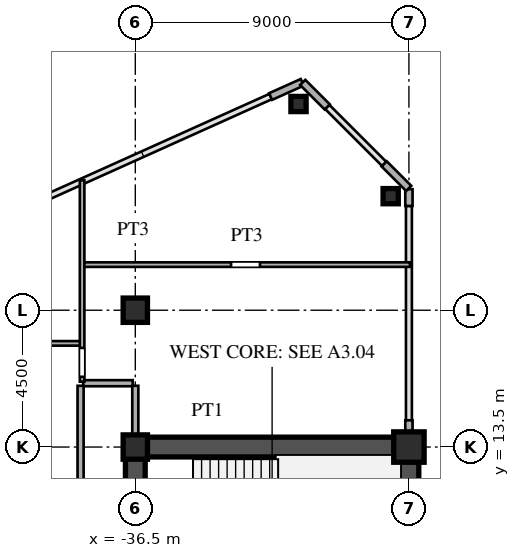
"""IFC4 building model, lengths in metres.
Left out: names, types, materials, properties, quantities, classifications, styles, units other than length and angle.
Written with IfcOpenShell. Run it as: python <this file> out.ifc"""

import sys

from ifc_helpers import new_model, si_unit, direction, frame, frame_2d, origin, origin_2d, place, context, subcontext, project, spatial, rectangle, hollow_rectangle, i_section, extrude, source, transform, mapped, element, save


model = new_model("IFC4")
c1 = context("Model", 3, precision=1e-05, world=origin(), true_north=direction((0.0, 1.0)))
c2 = subcontext(c1, "Body", "Model", "MODEL_VIEW")
j1 = project(units=[si_unit("LENGTHUNIT", "METRE"), si_unit("PLANEANGLEUNIT", "RADIAN")], contexts=[c1])
p1 = place(None, origin())
s1 = spatial("IfcSite", under=j1, at=p1, CompositionType="ELEMENT")
p2 = place(p1, origin())
s2 = spatial("IfcBuilding", under=s1, at=p2, CompositionType="ELEMENT")
p3 = place(p2, frame((0.0, 0.0, 72.9)))
s3 = spatial("IfcBuildingStorey", under=s2, at=p3, CompositionType="ELEMENT", Elevation=72.9)
m1 = source(origin(), c2, "Body", "SweptSolid", [
    extrude(hollow_rectangle(XDim=1.0, YDim=1.0, WallThickness=0.042, at=origin_2d()), origin(), (0.0, 0.0, 1.0), 3.6),
])
p4 = place(p3, frame((-27.5, 13.5, 0.0), z_axis=(0.0, 0.0, 1.0), x_axis=(1.0, 0.0, 0.0)))
e1 = element("IfcColumn", 1, at=p4, inside=s3, PredefinedType="COLUMN", context=c2, shape_type="MappedRepresentation", body=[
    mapped(m1, transform((0.0, 0.0, 0.0), scale=1.0)),
])
m2 = source(origin(), c2, "Body", "SweptSolid", [
    extrude(i_section(OverallWidth=0.8, OverallDepth=0.8, WebThickness=0.032, FlangeThickness=0.05, at=origin_2d()), origin(), (0.0, 0.0, 1.0), 3.6),
])
for number, where, z_axis, x_axis in (
    (2, (-36.5, 13.5, 0.0), (0.0, 0.0, 1.0), (1.0, 0.0, 0.0)),
    (3, (-36.5, 18.0, 0.0), (0.0, 0.0, 1.0), (1.0, 0.0, 0.0)),
):
    element("IfcColumn", number, at=place(p3, frame(where, z_axis=z_axis, x_axis=x_axis)), inside=s3, PredefinedType="COLUMN", context=c2, shape_type="MappedRepresentation", body=[
        mapped(m2, transform((0.0, 0.0, 0.0), scale=1.0)),
    ])
m3 = source(origin(), c2, "Body", "SweptSolid", [
    extrude(hollow_rectangle(XDim=0.5, YDim=0.5, WallThickness=0.02, at=origin_2d()), origin(), (0.0, 0.0, 1.0), 3.6),
])
for number, where, z_axis, x_axis in (
    (4, (-28.1, 21.751, 0.0), (0.0, 0.0, 1.0), (1.0, 0.0, 0.0)),
    (5, (-31.131, 24.783, 0.0), (0.0, 0.0, 1.0), (1.0, 0.0, 0.0)),
):
    element("IfcColumn", number, at=place(p3, frame(where, z_axis=z_axis, x_axis=x_axis)), inside=s3, PredefinedType="COLUMN", context=c2, shape_type="MappedRepresentation", body=[
        mapped(m3, transform((0.0, 0.0, 0.0), scale=1.0)),
    ])
p5 = place(p3, frame((-27.5, 13.83, 0.0), z_axis=(0.0, 0.0, 1.0), x_axis=(0.0, 1.0, 0.0)))
e6 = element("IfcWall", 6, at=p5, inside=s3, PredefinedType="SOLIDWALL", context=c2, shape_type="SweptSolid", body=[
    extrude(rectangle(XDim=0.55, YDim=0.24, at=frame_2d((0.275, 0.0))), origin(), (0.0, 0.0, 1.0), 2.88),
])
p6 = place(p3, frame((-27.5, 21.43, 0.0), z_axis=(0.0, 0.0, 1.0), x_axis=(0.0, 1.0, 0.0)))
e7 = element("IfcWall", 7, at=p6, inside=s3, PredefinedType="SOLIDWALL", context=c2, shape_type="SweptSolid", body=[
    extrude(rectangle(XDim=0.55, YDim=0.24, at=frame_2d((0.275, 0.0))), origin(), (0.0, 0.0, 1.0), 3.38),
])
for number, where, z_axis, x_axis in (
    (8, (-27.507, 22.007, 0.0), (0.0, 0.0, 1.0), (-0.707, 0.707, 0.0)),
    (9, (-30.187, 24.687, 0.0), (0.0, 0.0, 1.0), (-0.707, 0.707, 0.0)),
):
    element("IfcWall", number, at=place(p3, frame(where, z_axis=z_axis, x_axis=x_axis)), inside=s3, PredefinedType="SOLIDWALL", context=c2, shape_type="SweptSolid", body=[
        extrude(rectangle(XDim=1.14, YDim=0.24, at=frame_2d((0.57, 0.0))), origin(), (0.0, 0.0, 1.0), 3.38),
    ])
p7 = place(p3, frame((-31.009, 25.496, 0.0), z_axis=(0.0, 0.0, 1.0), x_axis=(-0.911929519623, -0.410346866979, 0.0)))
e10 = element("IfcWall", 10, at=p7, inside=s3, PredefinedType="SOLIDWALL", context=c2, shape_type="SweptSolid", body=[
    extrude(rectangle(XDim=1.14, YDim=0.24, at=frame_2d((0.57, 0.0))), origin(), (0.0, 0.0, 1.0), 3.38),
])
p8 = place(p3, frame((-27.5, 1.3, 0.0), z_axis=(0.0, 0.0, 1.0), x_axis=(0.0, 1.0, 0.0)))
e11 = element("IfcWall", 11, at=p8, inside=s3, PredefinedType="SHEAR", context=c2, shape_type="SweptSolid", body=[
    extrude(rectangle(XDim=12.2, YDim=0.65, at=frame_2d((6.1, 0.0))), origin(), (0.0, 0.0, 1.0), 3.38),
])
p9 = place(p3, frame((-36.5, 13.5, 0.0), z_axis=(0.0, 0.0, 1.0), x_axis=(1.0, 0.0, 0.0)))
e12 = element("IfcWall", 12, at=p9, inside=s3, PredefinedType="SHEAR", context=c2, shape_type="SweptSolid", body=[
    extrude(rectangle(XDim=9.0, YDim=0.65, at=frame_2d((4.5, 0.0))), origin(), (0.0, 0.0, 1.0), 3.38),
])
p10 = place(p3, frame((-36.5, 8.2, 0.0), z_axis=(0.0, 0.0, 1.0), x_axis=(0.0, 1.0, 0.0)))
e13 = element("IfcWall", 13, at=p10, inside=s3, PredefinedType="SHEAR", context=c2, shape_type="SweptSolid", body=[
    extrude(rectangle(XDim=5.45, YDim=0.65, at=frame_2d((2.725, 0.0))), origin(), (0.0, 0.0, 1.0), 3.38),
])
p11 = place(p10, frame((0.245, 0.0, 0.0)))
e14 = element("IfcOpeningElement", 14, at=p11, cuts=e13, PredefinedType="OPENING", context=c2, shape_type="SweptSolid", body=[
    extrude(rectangle(XDim=0.95, YDim=2.15, at=frame_2d((0.475, 1.075))), frame((0.0, 0.335, 0.0), z_axis=(0.0, -1.0, 0.0), x_axis=(1.0, 0.0, 0.0)), (0.0, 0.0, 1.0), 0.67),
])
p12 = place(p3, frame((-38.215, 15.6, 0.0), z_axis=(0.0, 0.0, 1.0), x_axis=(1.0, 0.0, 0.0)))
e15 = element("IfcWall", 15, at=p12, inside=s3, PredefinedType="PARTITIONING", context=c2, shape_type="SweptSolid", body=[
    extrude(rectangle(XDim=1.63, YDim=0.2, at=frame_2d((0.815, 0.0))), origin(), (0.0, 0.0, 1.0), 3.38),
])
p13 = place(p3, frame((-44.4, 16.91, 0.0), z_axis=(0.0, 0.0, 1.0), x_axis=(1.0, 0.0, 0.0)))
e16 = element("IfcWall", 16, at=p13, inside=s3, PredefinedType="PARTITIONING", context=c2, shape_type="SweptSolid", body=[
    extrude(rectangle(XDim=6.1, YDim=0.15, at=frame_2d((3.05, 0.0))), origin(), (0.0, 0.0, 1.0), 3.38),
])
p14 = place(p3, frame((-38.2, 19.5, 0.0), z_axis=(0.0, 0.0, 1.0), x_axis=(1.0, 0.0, 0.0)))
e17 = element("IfcWall", 17, at=p14, inside=s3, PredefinedType="PARTITIONING", context=c2, shape_type="SweptSolid", body=[
    extrude(rectangle(XDim=10.735, YDim=0.15, at=frame_2d((5.367, 0.0))), origin(), (0.0, 0.0, 1.0), 3.38),
])
p15 = place(p14, frame((4.85, 0.0, 0.0)))
e18 = element("IfcOpeningElement", 18, at=p15, cuts=e17, PredefinedType="OPENING", context=c2, shape_type="SweptSolid", body=[
    extrude(rectangle(XDim=0.95, YDim=2.15, at=frame_2d((0.475, 1.075))), frame((0.0, 0.085, 0.0), z_axis=(0.0, -1.0, 0.0), x_axis=(1.0, 0.0, 0.0)), (0.0, 0.0, 1.0), 0.17),
])
p16 = place(p3, frame((-38.3, -15.515, 0.0), z_axis=(0.0, 0.0, 1.0), x_axis=(0.0, 1.0, 0.0)))
e19 = element("IfcWall", 19, at=p16, inside=s3, PredefinedType="PARTITIONING", context=c2, shape_type="SweptSolid", body=[
    extrude(rectangle(XDim=31.03, YDim=0.2, at=frame_2d((15.515, 0.0))), origin(), (0.0, 0.0, 1.0), 3.38),
])
p17 = place(p16, frame((1.345, 0.0, 0.0)))
e20 = element("IfcOpeningElement", 20, at=p17, cuts=e19, PredefinedType="OPENING", context=c2, shape_type="SweptSolid", body=[
    extrude(rectangle(XDim=1.05, YDim=2.25, at=frame_2d((0.525, 1.125))), frame((0.0, 0.11, 0.0), z_axis=(0.0, -1.0, 0.0), x_axis=(1.0, 0.0, 0.0)), (0.0, 0.0, 1.0), 0.22),
])
p18 = place(p16, frame((12.28, 0.0, 0.0)))
e21 = element("IfcOpeningElement", 21, at=p18, cuts=e19, PredefinedType="OPENING", context=c2, shape_type="SweptSolid", body=[
    extrude(rectangle(XDim=1.05, YDim=2.25, at=frame_2d((0.525, 1.125))), frame((0.0, 0.11, 0.0), z_axis=(0.0, -1.0, 0.0), x_axis=(1.0, 0.0, 0.0)), (0.0, 0.0, 1.0), 0.22),
])
p19 = place(p16, frame((25.067, 0.0, 0.0)))
e22 = element("IfcOpeningElement", 22, at=p19, cuts=e19, PredefinedType="OPENING", context=c2, shape_type="SweptSolid", body=[
    extrude(rectangle(XDim=1.05, YDim=2.25, at=frame_2d((0.525, 1.125))), frame((0.0, 0.11, 0.0), z_axis=(0.0, -1.0, 0.0), x_axis=(1.0, 0.0, 0.0)), (0.0, 0.0, 1.0), 0.22),
])
p20 = place(p3, frame((-38.25, 15.65, 0.0), z_axis=(0.0, 0.0, 1.0), x_axis=(0.0, 1.0, 0.0)))
e23 = element("IfcWall", 23, at=p20, inside=s3, PredefinedType="PARTITIONING", context=c2, shape_type="SweptSolid", body=[
    extrude(rectangle(XDim=6.623, YDim=0.15, at=frame_2d((3.312, 0.0))), origin(), (0.0, 0.0, 1.0), 3.38),
])
p21 = place(p20, frame((0.16, 0.0, 0.0)))
e24 = element("IfcOpeningElement", 24, at=p21, cuts=e23, PredefinedType="OPENING", context=c2, shape_type="SweptSolid", body=[
    extrude(rectangle(XDim=0.95, YDim=2.15, at=frame_2d((0.475, 1.075))), frame((0.0, 0.085, 0.0), z_axis=(0.0, -1.0, 0.0), x_axis=(1.0, 0.0, 0.0)), (0.0, 0.0, 1.0), 0.17),
])
p22 = place(p3, frame((-36.5, 13.83, 0.0), z_axis=(0.0, 0.0, 1.0), x_axis=(0.0, 1.0, 0.0)))
e25 = element("IfcWall", 25, at=p22, inside=s3, PredefinedType="PARTITIONING", context=c2, shape_type="SweptSolid", body=[
    extrude(rectangle(XDim=1.685, YDim=0.2, at=frame_2d((0.842, 0.0))), origin(), (0.0, 0.0, 1.0), 2.68),
])
save(model, sys.argv[1])
